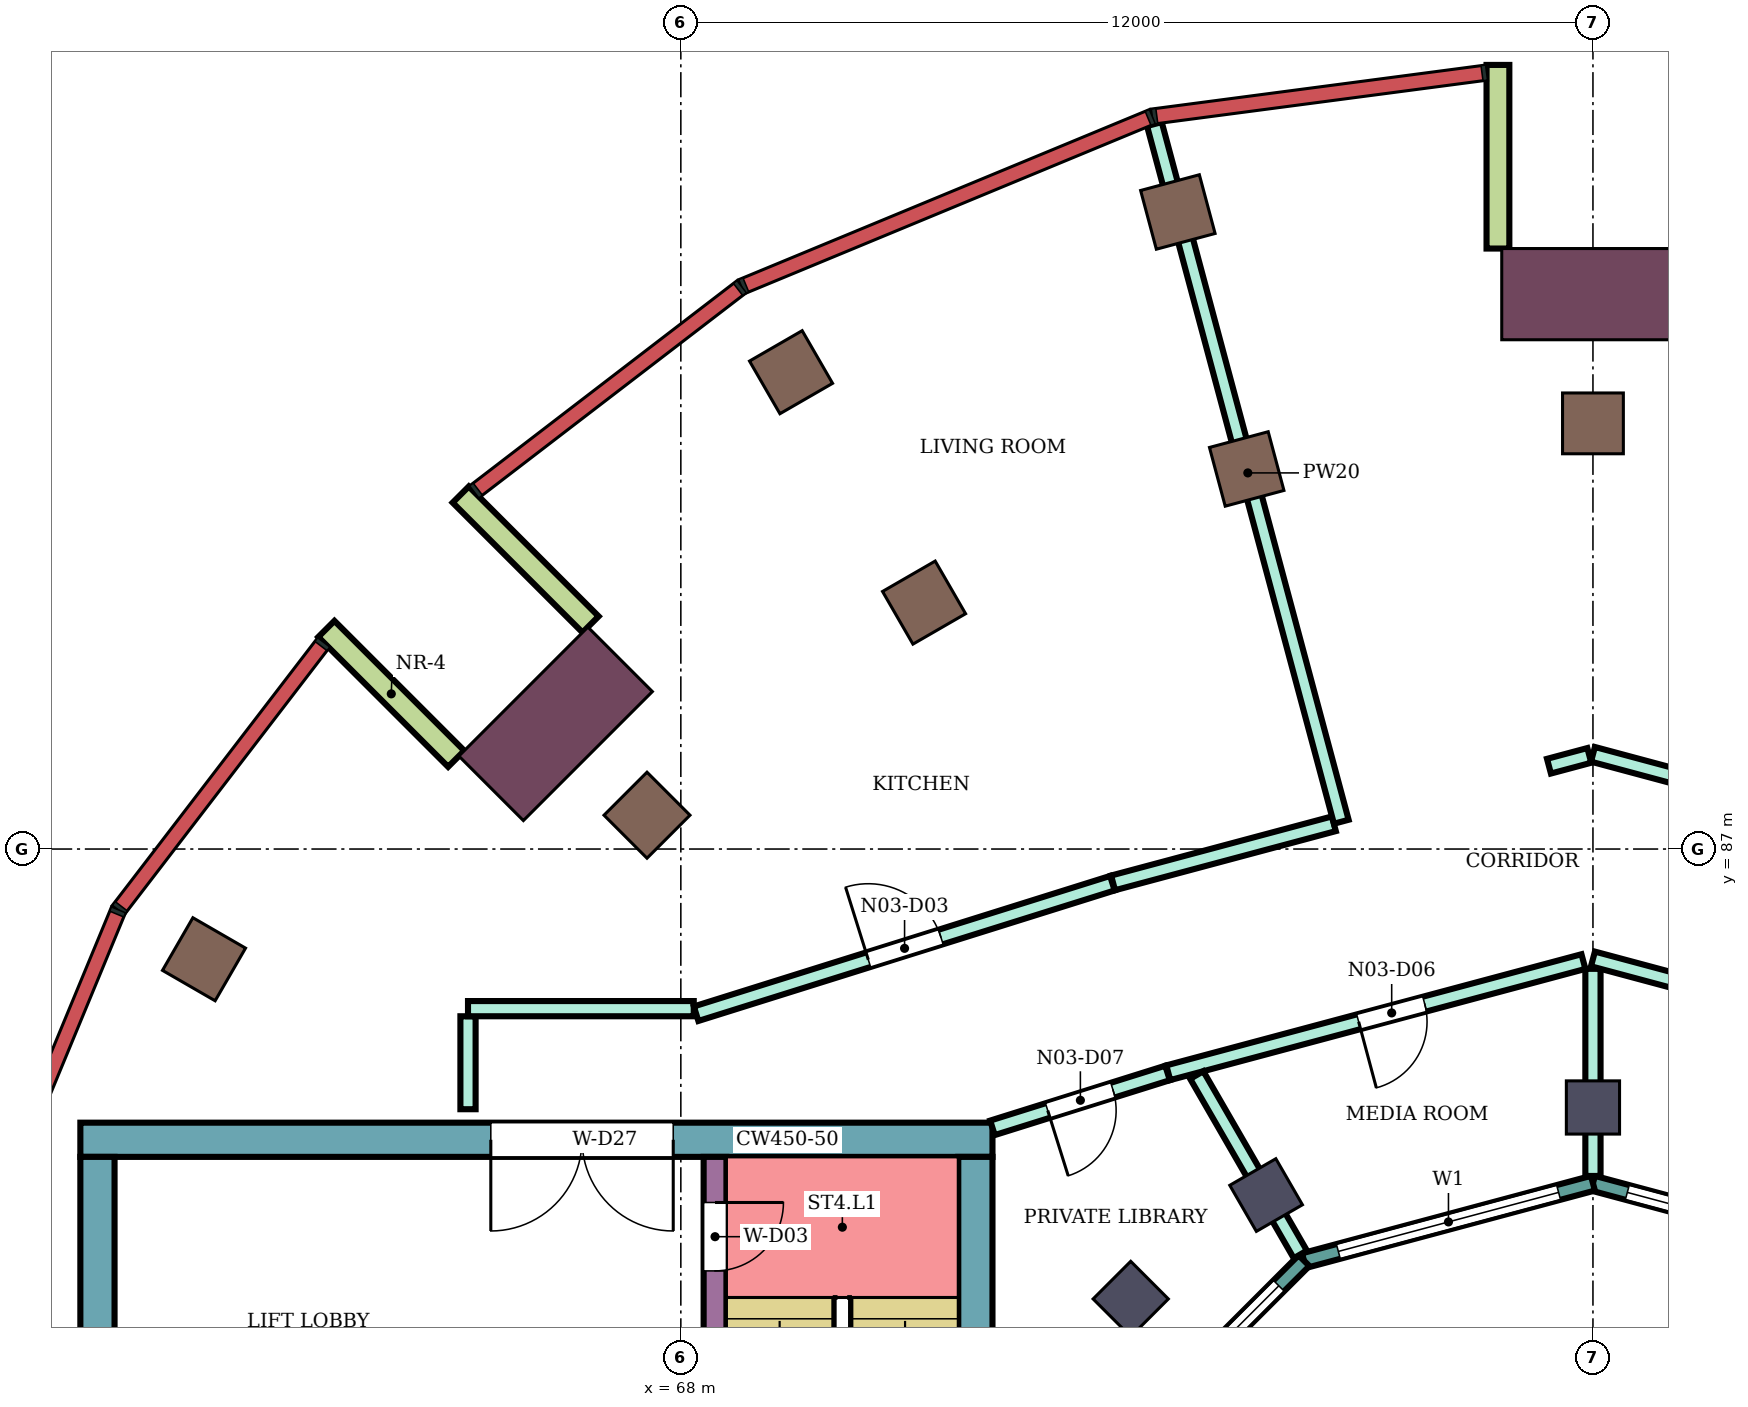
"""IFC4 building model, lengths in metres.
Left out: names, types, materials, properties, quantities, classifications, styles, units other than length and angle.
Written with IfcOpenShell. Run it as: python <this file> out.ifc"""

import sys

from ifc_helpers import new_model, si_unit, direction, frame, frame_2d, origin, origin_2d, place, context, subcontext, project, spatial, rectangle, extrude, element, fill, save


model = new_model("IFC4")
c1 = context("Model", 3, precision=1e-05, world=origin(), true_north=direction((0.0, 1.0)))
c2 = subcontext(c1, "Body", "Model", "MODEL_VIEW")
j1 = project(units=[si_unit("LENGTHUNIT", "METRE"), si_unit("PLANEANGLEUNIT", "RADIAN")], contexts=[c1])
p1 = place(None, origin())
s1 = spatial("IfcSite", under=j1, at=p1, CompositionType="ELEMENT")
p2 = place(p1, origin())
s2 = spatial("IfcBuilding", under=s1, at=p2, CompositionType="ELEMENT")
p3 = place(p2, frame((0.0, 0.0, 296.7)))
s3 = spatial("IfcBuildingStorey", under=s2, at=p3, CompositionType="ELEMENT", Elevation=296.7)
for number, where, z_axis, x_axis in (
    (1, (74.539, 95.381, 0.0), (0.0, 0.0, 1.0), (-0.259, 0.966, 0.0)),
    (2, (69.45, 93.273, 0.0), (0.0, 0.0, 1.0), (-0.5, 0.866, 0.0)),
    (3, (61.727, 85.55, 0.0), (0.0, 0.0, 1.0), (-0.866, 0.5, 0.0)),
    (4, (80.0, 92.6, 0.0), (0.0, 0.0, 1.0), (0.0, 1.0, 0.0)),
    (5, (75.445, 92.0, 0.0), (0.0, 0.0, 1.0), (-0.259, 0.966, 0.0)),
    (6, (71.2, 90.242, 0.0), (0.0, 0.0, 1.0), (-0.5, 0.866, 0.0)),
    (7, (67.555, 87.445, 0.0), (0.0, 0.0, 1.0), (-0.707, 0.707, 0.0)),
):
    element("IfcColumn", number, at=place(p3, frame(where, z_axis=z_axis, x_axis=x_axis)), inside=s3, PredefinedType="COLUMN", context=c2, shape_type="SweptSolid", body=[
        extrude(rectangle(XDim=0.8, YDim=0.8, at=origin_2d()), origin(), (0.0, 0.0, 1.0), 4.2),
    ])
for number, where, z_axis, x_axis in (
    (8, (80.0, 83.6, 0.0), (0.0, 0.0, 1.0), (0.0, 1.0, 0.0)),
    (9, (75.7, 82.448, 0.0), (0.0, 0.0, 1.0), (-0.5, 0.866, 0.0)),
    (10, (73.919, 81.081, 0.0), (0.0, 0.0, 1.0), (-0.707, 0.707, 0.0)),
):
    element("IfcColumn", number, at=place(p3, frame(where, z_axis=z_axis, x_axis=x_axis)), inside=s3, PredefinedType="COLUMN", context=c2, shape_type="SweptSolid", body=[
        extrude(rectangle(XDim=0.7, YDim=0.7, at=origin_2d()), origin(), (0.0, 0.0, 1.0), 4.2),
    ])
for number, where, z_axis, x_axis in (
    (11, (80.0, 94.3, 0.0), (0.0, 0.0, 1.0), (0.0, 1.0, 0.0)),
    (12, (66.353, 88.647, 0.0), (0.0, 0.0, 1.0), (-0.707, 0.707, 0.0)),
):
    element("IfcColumn", number, at=place(p3, frame(where, z_axis=z_axis, x_axis=x_axis)), inside=s3, PredefinedType="COLUMN", context=c2, shape_type="SweptSolid", body=[
        extrude(rectangle(XDim=1.2, YDim=2.4, at=origin_2d()), origin(), (0.0, 0.0, 1.0), 4.2),
    ])
p4 = place(p3, frame((72.1, 83.175, 0.0), z_axis=(0.0, 0.0, 1.0), x_axis=(-1.0, 0.0, 0.0)))
e13 = element("IfcWall", 13, at=p4, inside=s3, PredefinedType="SHEAR", context=c2, shape_type="SweptSolid", body=[
    extrude(rectangle(XDim=12.0, YDim=0.45, at=frame_2d((6.0, 0.0))), origin(), (0.0, 0.0, 1.0), 3.88),
])
p5 = place(p4, frame((4.2, 0.0, 0.0)))
e14 = element("IfcOpeningElement", 14, at=p5, cuts=e13, PredefinedType="OPENING", context=c2, shape_type="SweptSolid", body=[
    extrude(rectangle(XDim=2.4, YDim=2.4, at=frame_2d((1.2, 1.2))), frame((0.0, 0.235, 0.0), z_axis=(0.0, -1.0, 0.0), x_axis=(1.0, 0.0, 0.0)), (0.0, 0.0, 1.0), 0.47),
])
p6 = place(p3, frame((71.875, 82.95, 0.0), z_axis=(0.0, 0.0, 1.0), x_axis=(0.0, -1.0, 0.0)))
e15 = element("IfcWall", 15, at=p6, inside=s3, PredefinedType="SHEAR", context=c2, shape_type="SweptSolid", body=[
    extrude(rectangle(XDim=7.95, YDim=0.45, at=frame_2d((3.975, 0.0))), origin(), (0.0, 0.0, 1.0), 3.88),
])
p7 = place(p3, frame((60.325, 82.95, 0.0), z_axis=(0.0, 0.0, 1.0), x_axis=(0.0, -1.0, 0.0)))
e16 = element("IfcWall", 16, at=p7, inside=s3, PredefinedType="SHEAR", context=c2, shape_type="SweptSolid", body=[
    extrude(rectangle(XDim=3.7, YDim=0.45, at=frame_2d((1.85, 0.0))), origin(), (0.0, 0.0, 1.0), 3.88),
])
p8 = place(p3, frame((68.45, 82.95, 0.0), z_axis=(0.0, 0.0, 1.0), x_axis=(0.0, -1.0, 0.0)))
e17 = element("IfcWall", 17, at=p8, inside=s3, PredefinedType="SHEAR", context=c2, shape_type="SweptSolid", body=[
    extrude(rectangle(XDim=7.95, YDim=0.3, at=frame_2d((3.975, 0.0))), origin(), (0.0, 0.0, 1.0), 3.88),
])
p9 = place(p8, frame((0.6, 0.0, 0.0)))
e18 = element("IfcOpeningElement", 18, at=p9, cuts=e17, PredefinedType="OPENING", context=c2, shape_type="SweptSolid", body=[
    extrude(rectangle(XDim=0.9, YDim=2.1, at=frame_2d((0.45, 1.05))), frame((0.0, 0.16, 0.0), z_axis=(0.0, -1.0, 0.0), x_axis=(1.0, 0.0, 0.0)), (0.0, 0.0, 1.0), 0.32),
])
for number, where, z_axis, x_axis in (
    (19, (78.75, 94.9, 0.0), (0.0, 0.0, 1.0), (0.0, 1.0, 0.0)),
    (20, (66.812, 89.955, 0.0), (0.0, 0.0, 1.0), (-0.707, 0.707, 0.0)),
    (21, (65.045, 88.188, 0.0), (0.0, 0.0, 1.0), (-0.707, 0.707, 0.0)),
):
    element("IfcWall", number, at=place(p3, frame(where, z_axis=z_axis, x_axis=x_axis)), inside=s3, PredefinedType="NOTDEFINED", context=c2, shape_type="SweptSolid", body=[
        extrude(rectangle(XDim=2.416, YDim=0.3, at=frame_2d((1.208, 0.0))), origin(), (0.0, 0.0, 1.0), 4.2),
    ])
p10 = place(p3, frame((83.802, 81.585, 0.0), z_axis=(0.0, 0.0, 1.0), x_axis=(-0.965933654434, 0.258789828301, 0.0)))
e22 = element("IfcWall", 22, at=p10, inside=s3, PredefinedType="NOTDEFINED", context=c2, shape_type="SweptSolid", body=[
    extrude(rectangle(XDim=3.936, YDim=0.2, at=frame_2d((1.968, 0.0))), origin(), (0.0, 0.0, 1.0), 4.2),
])
p11 = place(p10, frame((0.468, 0.0, 0.9)))
e23 = element("IfcOpeningElement", 23, at=p11, cuts=e22, PredefinedType="OPENING", context=c2, shape_type="SweptSolid", body=[
    extrude(rectangle(XDim=3.0, YDim=2.3, at=frame_2d((1.5, 1.15))), frame((0.0, 0.11, 0.0), z_axis=(0.0, -1.0, 0.0), x_axis=(1.0, 0.0, 0.0)), (0.0, 0.0, 1.0), 0.22),
])
p12 = place(p3, frame((80.0, 82.604, 0.0), z_axis=(0.0, 0.0, 1.0), x_axis=(-0.965933654434, -0.258789828301, 0.0)))
e24 = element("IfcWall", 24, at=p12, inside=s3, PredefinedType="NOTDEFINED", context=c2, shape_type="SweptSolid", body=[
    extrude(rectangle(XDim=3.936, YDim=0.2, at=frame_2d((1.968, 0.0))), origin(), (0.0, 0.0, 1.0), 4.2),
])
p13 = place(p12, frame((0.468, 0.0, 0.9)))
e25 = element("IfcOpeningElement", 25, at=p13, cuts=e24, PredefinedType="OPENING", context=c2, shape_type="SweptSolid", body=[
    extrude(rectangle(XDim=3.0, YDim=2.3, at=frame_2d((1.5, 1.15))), frame((0.0, 0.11, 0.0), z_axis=(0.0, -1.0, 0.0), x_axis=(1.0, 0.0, 0.0)), (0.0, 0.0, 1.0), 0.22),
])
p14 = place(p3, frame((76.198, 81.585, 0.0), z_axis=(0.0, 0.0, 1.0), x_axis=(-0.707106781187, -0.707106781187, 0.0)))
e26 = element("IfcWall", 26, at=p14, inside=s3, PredefinedType="NOTDEFINED", context=c2, shape_type="SweptSolid", body=[
    extrude(rectangle(XDim=3.936, YDim=0.2, at=frame_2d((1.968, 0.0))), origin(), (0.0, 0.0, 1.0), 4.2),
])
p15 = place(p14, frame((0.468, 0.0, 0.9)))
e27 = element("IfcOpeningElement", 27, at=p15, cuts=e26, PredefinedType="OPENING", context=c2, shape_type="SweptSolid", body=[
    extrude(rectangle(XDim=3.0, YDim=2.3, at=frame_2d((1.5, 1.15))), frame((0.0, 0.11, 0.0), z_axis=(0.0, -1.0, 0.0), x_axis=(1.0, 0.0, 0.0)), (0.0, 0.0, 1.0), 0.22),
])
p16 = place(p3, frame((65.2, 83.577, 0.0), z_axis=(0.0, 0.0, 1.0), x_axis=(0.0, 1.0, 0.0)))
e28 = element("IfcWall", 28, at=p16, inside=s3, PredefinedType="PARTITIONING", context=c2, shape_type="SweptSolid", body=[
    extrude(rectangle(XDim=1.223, YDim=0.2, at=frame_2d((0.612, 0.0))), origin(), (0.0, 0.0, 1.0), 3.75),
])
p17 = place(p3, frame((65.2, 84.9, 0.0), z_axis=(0.0, 0.0, 1.0), x_axis=(1.0, 0.0, 0.0)))
e29 = element("IfcWall", 29, at=p17, inside=s3, PredefinedType="PARTITIONING", context=c2, shape_type="SweptSolid", body=[
    extrude(rectangle(XDim=2.97, YDim=0.2, at=frame_2d((1.485, 0.0))), origin(), (0.0, 0.0, 1.0), 3.75),
])
p18 = place(p3, frame((68.201, 84.833, 0.0), z_axis=(0.0, 0.0, 1.0), x_axis=(0.95420102455, 0.299166182492, 0.0)))
e30 = element("IfcWall", 30, at=p18, inside=s3, PredefinedType="PARTITIONING", context=c2, shape_type="SweptSolid", body=[
    extrude(rectangle(XDim=5.74, YDim=0.2, at=frame_2d((2.87, 0.0))), origin(), (0.0, 0.0, 1.0), 3.75),
])
p19 = place(p18, frame((2.374, 0.0, 0.0)))
e31 = element("IfcOpeningElement", 31, at=p19, cuts=e30, PredefinedType="OPENING", context=c2, shape_type="SweptSolid", body=[
    extrude(rectangle(XDim=1.0, YDim=2.1, at=frame_2d((0.5, 1.05))), frame((0.0, 0.11, 0.0), z_axis=(0.0, -1.0, 0.0), x_axis=(1.0, 0.0, 0.0)), (0.0, 0.0, 1.0), 0.22),
])
p20 = place(p3, frame((72.1, 83.332, 0.0), z_axis=(0.0, 0.0, 1.0), x_axis=(0.954233106619, 0.299063836383, 0.0)))
e32 = element("IfcWall", 32, at=p20, inside=s3, PredefinedType="PARTITIONING", context=c2, shape_type="SweptSolid", body=[
    extrude(rectangle(XDim=2.414, YDim=0.2, at=frame_2d((1.207, 0.0))), origin(), (0.0, 0.0, 1.0), 3.75),
])
p21 = place(p20, frame((0.762, 0.0, 0.0)))
e33 = element("IfcOpeningElement", 33, at=p21, cuts=e32, PredefinedType="OPENING", context=c2, shape_type="SweptSolid", body=[
    extrude(rectangle(XDim=0.9, YDim=2.1, at=frame_2d((0.45, 1.05))), frame((0.0, 0.11, 0.0), z_axis=(0.0, -1.0, 0.0), x_axis=(1.0, 0.0, 0.0)), (0.0, 0.0, 1.0), 0.22),
])
p22 = place(p3, frame((73.687, 86.555, 0.0), z_axis=(0.0, 0.0, 1.0), x_axis=(0.965987897826, 0.258587279759, 0.0)))
e34 = element("IfcWall", 34, at=p22, inside=s3, PredefinedType="PARTITIONING", context=c2, shape_type="SweptSolid", body=[
    extrude(rectangle(XDim=3.007, YDim=0.2, at=frame_2d((1.503, 0.0))), origin(), (0.0, 0.0, 1.0), 3.75),
])
p23 = place(p3, frame((74.23, 96.538, 0.0), z_axis=(0.0, 0.0, 1.0), x_axis=(0.258775468547, -0.965937501538, 0.0)))
e35 = element("IfcWall", 35, at=p23, inside=s3, PredefinedType="PARTITIONING", context=c2, shape_type="SweptSolid", body=[
    extrude(rectangle(XDim=9.502, YDim=0.2, at=frame_2d((4.751, 0.0))), origin(), (0.0, 0.0, 1.0), 3.75),
])
p24 = place(p3, frame((74.413, 84.057, 0.0), z_axis=(0.0, 0.0, 1.0), x_axis=(0.965972135939, 0.258646153246, 0.0)))
e36 = element("IfcWall", 36, at=p24, inside=s3, PredefinedType="PARTITIONING", context=c2, shape_type="SweptSolid", body=[
    extrude(rectangle(XDim=5.654, YDim=0.2, at=frame_2d((2.827, 0.0))), origin(), (0.0, 0.0, 1.0), 3.75),
])
p25 = place(p24, frame((2.593, 0.0, 0.0)))
e37 = element("IfcOpeningElement", 37, at=p25, cuts=e36, PredefinedType="OPENING", context=c2, shape_type="SweptSolid", body=[
    extrude(rectangle(XDim=0.9, YDim=2.1, at=frame_2d((0.45, 1.05))), frame((0.0, 0.11, 0.0), z_axis=(0.0, -1.0, 0.0), x_axis=(1.0, 0.0, 0.0)), (0.0, 0.0, 1.0), 0.22),
])
p26 = place(p3, frame((74.787, 84.027, 0.0), z_axis=(0.0, 0.0, 1.0), x_axis=(0.500079107518, -0.86597972622, 0.0)))
e38 = element("IfcWall", 38, at=p26, inside=s3, PredefinedType="PARTITIONING", context=c2, shape_type="SweptSolid", body=[
    extrude(rectangle(XDim=2.726, YDim=0.2, at=frame_2d((1.363, 0.0))), origin(), (0.0, 0.0, 1.0), 3.75),
])
p27 = place(p3, frame((79.421, 88.09, 0.0), z_axis=(0.0, 0.0, 1.0), x_axis=(0.966065016104, 0.258299021793, 0.0)))
e39 = element("IfcWall", 39, at=p27, inside=s3, PredefinedType="PARTITIONING", context=c2, shape_type="SweptSolid", body=[
    extrude(rectangle(XDim=0.549, YDim=0.2, at=frame_2d((0.274, 0.0))), origin(), (0.0, 0.0, 1.0), 3.75),
])
p28 = place(p3, frame((80.0, 82.699, 0.0), z_axis=(0.0, 0.0, 1.0), x_axis=(0.0, 1.0, 0.0)))
e40 = element("IfcWall", 40, at=p28, inside=s3, PredefinedType="PARTITIONING", context=c2, shape_type="SweptSolid", body=[
    extrude(rectangle(XDim=2.725, YDim=0.2, at=frame_2d((1.363, 0.0))), origin(), (0.0, 0.0, 1.0), 3.75),
])
p29 = place(p3, frame((80.0, 85.554, 0.0), z_axis=(0.0, 0.0, 1.0), x_axis=(0.965928989968, -0.258807237802, 0.0)))
e41 = element("IfcWall", 41, at=p29, inside=s3, PredefinedType="PARTITIONING", context=c2, shape_type="SweptSolid", body=[
    extrude(rectangle(XDim=5.774, YDim=0.2, at=frame_2d((2.887, 0.0))), origin(), (0.0, 0.0, 1.0), 3.75),
])
p30 = place(p29, frame((2.292, 0.0, 0.0)))
e42 = element("IfcOpeningElement", 42, at=p30, cuts=e41, PredefinedType="OPENING", context=c2, shape_type="SweptSolid", body=[
    extrude(rectangle(XDim=0.9, YDim=2.1, at=frame_2d((0.45, 1.05))), frame((0.0, 0.11, 0.0), z_axis=(0.0, -1.0, 0.0), x_axis=(1.0, 0.0, 0.0)), (0.0, 0.0, 1.0), 0.22),
])
p31 = place(p3, frame((80.0, 88.246, 0.0), z_axis=(0.0, 0.0, 1.0), x_axis=(0.965856994925, -0.259075790752, 0.0)))
e43 = element("IfcWall", 43, at=p31, inside=s3, PredefinedType="PARTITIONING", context=c2, shape_type="SweptSolid", body=[
    extrude(rectangle(XDim=6.526, YDim=0.2, at=frame_2d((3.263, 0.0))), origin(), (0.0, 0.0, 1.0), 3.75),
])
p32 = place(p31, frame((2.768, 0.0, 0.0)))
e44 = element("IfcOpeningElement", 44, at=p32, cuts=e43, PredefinedType="OPENING", context=c2, shape_type="SweptSolid", body=[
    extrude(rectangle(XDim=1.0, YDim=2.1, at=frame_2d((0.5, 1.05))), frame((0.0, 0.11, 0.0), z_axis=(0.0, -1.0, 0.0), x_axis=(1.0, 0.0, 0.0)), (0.0, 0.0, 1.0), 0.22),
])
p33 = place(p11, origin())
e45 = element("IfcWindow", 45, at=p33, inside=s3, PartitioningType="SINGLE_PANEL", PredefinedType="WINDOW", context=c2, shape_type="SweptSolid", body=[
    extrude(rectangle(XDim=3.0, YDim=2.3, at=frame_2d((1.5, 1.15))), frame((0.0, 0.03, 0.0), z_axis=(0.0, -1.0, 0.0), x_axis=(1.0, 0.0, 0.0)), (0.0, 0.0, 1.0), 0.06),
])
fill(e23, e45)
p34 = place(p13, origin())
e46 = element("IfcWindow", 46, at=p34, inside=s3, PartitioningType="SINGLE_PANEL", PredefinedType="WINDOW", context=c2, shape_type="SweptSolid", body=[
    extrude(rectangle(XDim=3.0, YDim=2.3, at=frame_2d((1.5, 1.15))), frame((0.0, 0.03, 0.0), z_axis=(0.0, -1.0, 0.0), x_axis=(1.0, 0.0, 0.0)), (0.0, 0.0, 1.0), 0.06),
])
fill(e25, e46)
p35 = place(p15, origin())
e47 = element("IfcWindow", 47, at=p35, inside=s3, PartitioningType="SINGLE_PANEL", PredefinedType="WINDOW", context=c2, shape_type="SweptSolid", body=[
    extrude(rectangle(XDim=3.0, YDim=2.3, at=frame_2d((1.5, 1.15))), frame((0.0, 0.03, 0.0), z_axis=(0.0, -1.0, 0.0), x_axis=(1.0, 0.0, 0.0)), (0.0, 0.0, 1.0), 0.06),
])
fill(e27, e47)
p36 = place(p19, origin())
e48 = element("IfcDoor", 48, at=p36, inside=s3, OperationType="SINGLE_SWING_LEFT", PredefinedType="DOOR", context=c2, shape_type="SweptSolid", body=[
    extrude(rectangle(XDim=1.0, YDim=2.1, at=frame_2d((0.5, 1.05))), frame((0.0, 0.025, 0.0), z_axis=(0.0, -1.0, 0.0), x_axis=(1.0, 0.0, 0.0)), (0.0, 0.0, 1.0), 0.05),
])
fill(e31, e48)
p37 = place(p25, frame((0.9, 0.0, 0.0), z_axis=(0.0, 0.0, 1.0), x_axis=(-1.0, 0.0, 0.0)))
e49 = element("IfcDoor", 49, at=p37, inside=s3, OperationType="SINGLE_SWING_RIGHT", PredefinedType="DOOR", context=c2, shape_type="SweptSolid", body=[
    extrude(rectangle(XDim=0.9, YDim=2.1, at=frame_2d((0.45, 1.05))), frame((0.0, 0.025, 0.0), z_axis=(0.0, -1.0, 0.0), x_axis=(1.0, 0.0, 0.0)), (0.0, 0.0, 1.0), 0.05),
])
fill(e37, e49)
p38 = place(p21, frame((0.9, 0.0, 0.0), z_axis=(0.0, 0.0, 1.0), x_axis=(-1.0, 0.0, 0.0)))
e50 = element("IfcDoor", 50, at=p38, inside=s3, OperationType="SINGLE_SWING_RIGHT", PredefinedType="DOOR", context=c2, shape_type="SweptSolid", body=[
    extrude(rectangle(XDim=0.9, YDim=2.1, at=frame_2d((0.45, 1.05))), frame((0.0, 0.025, 0.0), z_axis=(0.0, -1.0, 0.0), x_axis=(1.0, 0.0, 0.0)), (0.0, 0.0, 1.0), 0.05),
])
fill(e33, e50)
p39 = place(p9, origin())
e51 = element("IfcDoor", 51, at=p39, inside=s3, OperationType="SINGLE_SWING_LEFT", PredefinedType="DOOR", context=c2, shape_type="SweptSolid", body=[
    extrude(rectangle(XDim=0.9, YDim=2.1, at=frame_2d((0.45, 1.05))), frame((0.0, 0.025, 0.0), z_axis=(0.0, -1.0, 0.0), x_axis=(1.0, 0.0, 0.0)), (0.0, 0.0, 1.0), 0.05),
])
fill(e18, e51)
p40 = place(p5, origin())
e52 = element("IfcDoor", 52, at=p40, inside=s3, OperationType="DOUBLE_DOOR_SINGLE_SWING", PredefinedType="DOOR", context=c2, shape_type="SweptSolid", body=[
    extrude(rectangle(XDim=2.4, YDim=2.4, at=frame_2d((1.2, 1.2))), frame((0.0, 0.025, 0.0), z_axis=(0.0, -1.0, 0.0), x_axis=(1.0, 0.0, 0.0)), (0.0, 0.0, 1.0), 0.05),
])
fill(e14, e52)
save(model, sys.argv[1])
